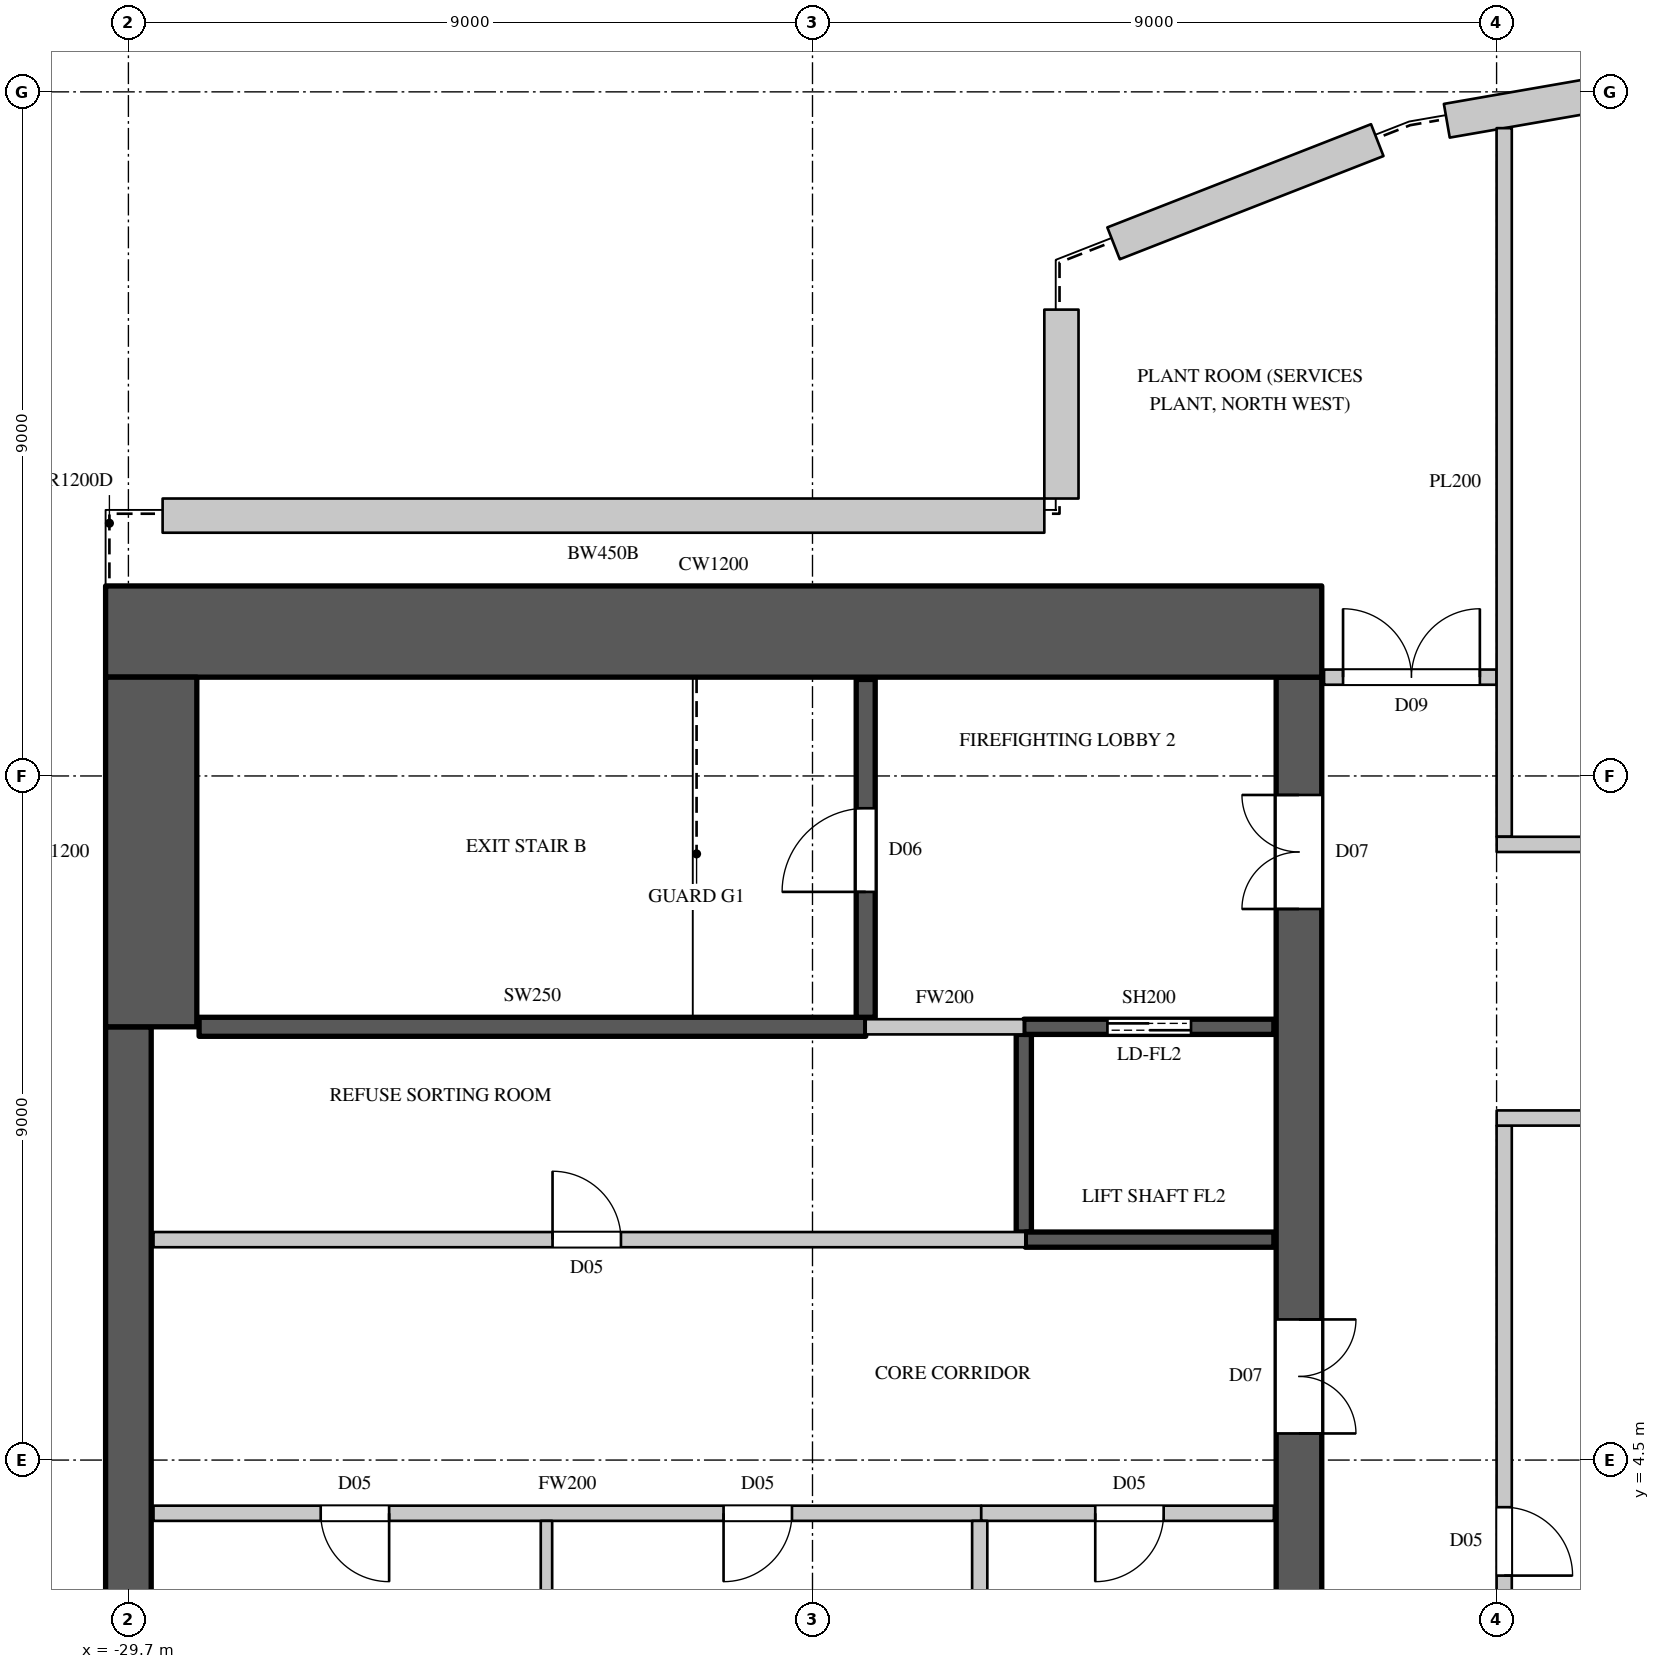
"""IFC4 building model, lengths in metres.
Left out: names, types, materials, properties, quantities, classifications, styles, units other than length and angle.
Written with IfcOpenShell. Run it as: python <this file> out.ifc"""

import sys

from ifc_helpers import new_model, si_unit, direction, frame, frame_2d, origin, place, context, subcontext, project, spatial, rectangle, extrude, element, fill, save


model = new_model("IFC4")
c1 = context("Model", 3, precision=1e-05, world=origin(), true_north=direction((0.0, 1.0)))
c2 = subcontext(c1, "Body", "Model", "MODEL_VIEW")
j1 = project(units=[si_unit("LENGTHUNIT", "METRE"), si_unit("PLANEANGLEUNIT", "RADIAN")], contexts=[c1])
p1 = place(None, origin())
s1 = spatial("IfcSite", under=j1, at=p1, CompositionType="ELEMENT")
p2 = place(p1, origin())
s2 = spatial("IfcBuilding", under=s1, at=p2, CompositionType="ELEMENT")
p3 = place(p2, frame((0.0, 0.0, 355.0)))
s3 = spatial("IfcBuildingStorey", under=s2, at=p3, CompositionType="ELEMENT", Elevation=355.0)
p4 = place(p3, frame((-6.782, 23.088, 0.0), z_axis=(0.0, 0.0, 1.0), x_axis=(-0.985240251318, -0.171177239091, 0.0)))
e1 = element("IfcWall", 1, at=p4, inside=s3, PredefinedType="SOLIDWALL", context=c2, shape_type="SweptSolid", body=[
    extrude(rectangle(XDim=5.656, YDim=0.45, at=frame_2d((2.828, 0.0))), origin(), (0.0, 0.0, 1.0), 4.0),
])
p5 = place(p3, frame((-13.27, 21.865, 0.0), z_axis=(0.0, 0.0, 1.0), x_axis=(-0.931207968362, -0.364488298384, 0.0)))
e2 = element("IfcWall", 2, at=p5, inside=s3, PredefinedType="SOLIDWALL", context=c2, shape_type="SweptSolid", body=[
    extrude(rectangle(XDim=3.726, YDim=0.45, at=frame_2d((1.863, 0.0))), origin(), (0.0, 0.0, 1.0), 4.0),
])
p6 = place(p3, frame((-17.425, 19.635, 0.0), z_axis=(0.0, 0.0, 1.0), x_axis=(0.0, -1.0, 0.0)))
e3 = element("IfcWall", 3, at=p6, inside=s3, PredefinedType="SOLIDWALL", context=c2, shape_type="SweptSolid", body=[
    extrude(rectangle(XDim=2.485, YDim=0.45, at=frame_2d((1.243, 0.0))), origin(), (0.0, 0.0, 1.0), 4.0),
])
p7 = place(p3, frame((-17.65, 16.925, 0.0), z_axis=(0.0, 0.0, 1.0), x_axis=(-1.0, 0.0, 0.0)))
e4 = element("IfcWall", 4, at=p7, inside=s3, PredefinedType="SOLIDWALL", context=c2, shape_type="SweptSolid", body=[
    extrude(rectangle(XDim=11.6, YDim=0.45, at=frame_2d((5.8, 0.0))), origin(), (0.0, 0.0, 1.0), 4.0),
])
p8 = place(p3, frame((-30.0, 15.4, 0.0), z_axis=(0.0, 0.0, 1.0), x_axis=(1.0, 0.0, 0.0)))
e5 = element("IfcWall", 5, at=p8, inside=s3, PredefinedType="SHEAR", context=c2, shape_type="SweptSolid", body=[
    extrude(rectangle(XDim=16.0, YDim=1.2, at=frame_2d((8.0, 0.0))), origin(), (0.0, 0.0, 1.0), 4.0),
])
p9 = place(p3, frame((-14.3, -14.8, 0.0), z_axis=(0.0, 0.0, 1.0), x_axis=(0.0, 1.0, 0.0)))
e6 = element("IfcWall", 6, at=p9, inside=s3, PredefinedType="SHEAR", context=c2, shape_type="SweptSolid", body=[
    extrude(rectangle(XDim=29.6, YDim=0.6, at=frame_2d((14.8, 0.0))), origin(), (0.0, 0.0, 1.0), 4.0),
])
p10 = place(p9, frame((1.55, 0.0, 0.0)))
e7 = element("IfcOpeningElement", 7, at=p10, cuts=e6, PredefinedType="OPENING", context=c2, shape_type="SweptSolid", body=[
    extrude(rectangle(XDim=1.5, YDim=2.4, at=frame_2d((0.75, 1.2))), frame((0.0, 0.31, 0.0), z_axis=(0.0, -1.0, 0.0), x_axis=(1.0, 0.0, 0.0)), (0.0, 0.0, 1.0), 0.62),
])
p11 = place(p9, frame((26.55, 0.0, 0.0)))
e8 = element("IfcOpeningElement", 8, at=p11, cuts=e6, PredefinedType="OPENING", context=c2, shape_type="SweptSolid", body=[
    extrude(rectangle(XDim=1.5, YDim=2.4, at=frame_2d((0.75, 1.2))), frame((0.0, 0.31, 0.0), z_axis=(0.0, -1.0, 0.0), x_axis=(1.0, 0.0, 0.0)), (0.0, 0.0, 1.0), 0.62),
])
p12 = place(p9, frame((8.45, 0.0, 0.0)))
e9 = element("IfcOpeningElement", 9, at=p12, cuts=e6, PredefinedType="OPENING", context=c2, shape_type="SweptSolid", body=[
    extrude(rectangle(XDim=1.5, YDim=2.4, at=frame_2d((0.75, 1.2))), frame((0.0, 0.31, 0.0), z_axis=(0.0, -1.0, 0.0), x_axis=(1.0, 0.0, 0.0)), (0.0, 0.0, 1.0), 0.62),
])
p13 = place(p9, frame((19.65, 0.0, 0.0)))
e10 = element("IfcOpeningElement", 10, at=p13, cuts=e6, PredefinedType="OPENING", context=c2, shape_type="SweptSolid", body=[
    extrude(rectangle(XDim=1.5, YDim=2.4, at=frame_2d((0.75, 1.2))), frame((0.0, 0.31, 0.0), z_axis=(0.0, -1.0, 0.0), x_axis=(1.0, 0.0, 0.0)), (0.0, 0.0, 1.0), 0.62),
])
p14 = place(p9, frame((14.5, 0.0, 0.0)))
e11 = element("IfcOpeningElement", 11, at=p14, cuts=e6, PredefinedType="OPENING", context=c2, shape_type="SweptSolid", body=[
    extrude(rectangle(XDim=0.6, YDim=2.0, at=frame_2d((0.3, 1.0))), frame((0.0, 0.31, 0.0), z_axis=(0.0, -1.0, 0.0), x_axis=(1.0, 0.0, 0.0)), (0.0, 0.0, 1.0), 0.62),
])
p15 = place(p3, frame((-29.7, -10.2, 0.0), z_axis=(0.0, 0.0, 1.0), x_axis=(0.0, 1.0, 0.0)))
e12 = element("IfcWall", 12, at=p15, inside=s3, PredefinedType="SHEAR", context=c2, shape_type="SweptSolid", body=[
    extrude(rectangle(XDim=20.4, YDim=0.6, at=frame_2d((10.2, 0.0))), origin(), (0.0, 0.0, 1.0), 4.0),
])
p16 = place(p3, frame((-29.4, 10.2, 0.0), z_axis=(0.0, 0.0, 1.0), x_axis=(0.0, 1.0, 0.0)))
e13 = element("IfcWall", 13, at=p16, inside=s3, PredefinedType="SHEAR", context=c2, shape_type="SweptSolid", body=[
    extrude(rectangle(XDim=4.6, YDim=1.2, at=frame_2d((2.3, 0.0))), origin(), (0.0, 0.0, 1.0), 4.0),
])
p17 = place(p3, frame((-29.37, 3.8, 0.0), z_axis=(0.0, 0.0, 1.0), x_axis=(1.0, 0.0, 0.0)))
e14 = element("IfcWall", 14, at=p17, inside=s3, PredefinedType="PARTITIONING", context=c2, shape_type="SweptSolid", body=[
    extrude(rectangle(XDim=10.89, YDim=0.2, at=frame_2d((5.445, 0.0))), origin(), (0.0, 0.0, 1.0), 3.548),
])
p18 = place(p17, frame((2.2, 0.0, 0.0)))
e15 = element("IfcOpeningElement", 15, at=p18, cuts=e14, PredefinedType="OPENING", context=c2, shape_type="SweptSolid", body=[
    extrude(rectangle(XDim=0.9, YDim=2.2, at=frame_2d((0.45, 1.1))), frame((0.0, 0.11, 0.0), z_axis=(0.0, -1.0, 0.0), x_axis=(1.0, 0.0, 0.0)), (0.0, 0.0, 1.0), 0.22),
])
p19 = place(p17, frame((7.5, 0.0, 0.0)))
e16 = element("IfcOpeningElement", 16, at=p19, cuts=e14, PredefinedType="OPENING", context=c2, shape_type="SweptSolid", body=[
    extrude(rectangle(XDim=0.9, YDim=2.2, at=frame_2d((0.45, 1.1))), frame((0.0, 0.11, 0.0), z_axis=(0.0, -1.0, 0.0), x_axis=(1.0, 0.0, 0.0)), (0.0, 0.0, 1.0), 0.22),
])
p20 = place(p3, frame((-29.37, 7.4, 0.0), z_axis=(0.0, 0.0, 1.0), x_axis=(1.0, 0.0, 0.0)))
e17 = element("IfcWall", 17, at=p20, inside=s3, PredefinedType="PARTITIONING", context=c2, shape_type="SweptSolid", body=[
    extrude(rectangle(XDim=11.47, YDim=0.2, at=frame_2d((5.735, 0.0))), origin(), (0.0, 0.0, 1.0), 3.548),
])
p21 = place(p20, frame((5.25, 0.0, 0.0)))
e18 = element("IfcOpeningElement", 18, at=p21, cuts=e17, PredefinedType="OPENING", context=c2, shape_type="SweptSolid", body=[
    extrude(rectangle(XDim=0.9, YDim=2.2, at=frame_2d((0.45, 1.1))), frame((0.0, 0.11, 0.0), z_axis=(0.0, -1.0, 0.0), x_axis=(1.0, 0.0, 0.0)), (0.0, 0.0, 1.0), 0.22),
])
p22 = place(p3, frame((-20.0, 10.2, 0.0), z_axis=(0.0, 0.0, 1.0), x_axis=(1.0, 0.0, 0.0)))
e19 = element("IfcWall", 19, at=p22, inside=s3, PredefinedType="PARTITIONING", context=c2, shape_type="SweptSolid", body=[
    extrude(rectangle(XDim=2.08, YDim=0.2, at=frame_2d((1.04, 0.0))), origin(), (0.0, 0.0, 1.0), 3.548),
])
p23 = place(p3, frame((-11.6, -2.02, 0.0), z_axis=(0.0, 0.0, 1.0), x_axis=(0.0, 1.0, 0.0)))
e20 = element("IfcWall", 20, at=p23, inside=s3, PredefinedType="PARTITIONING", context=c2, shape_type="SweptSolid", body=[
    extrude(rectangle(XDim=10.919, YDim=0.2, at=frame_2d((5.459, 0.0))), origin(), (0.0, 0.0, 1.0), 3.548),
])
p24 = place(p23, frame((5.0, 0.0, 0.0)))
e21 = element("IfcOpeningElement", 21, at=p24, cuts=e20, PredefinedType="OPENING", context=c2, shape_type="SweptSolid", body=[
    extrude(rectangle(XDim=0.9, YDim=2.2, at=frame_2d((0.45, 1.1))), frame((0.0, 0.11, 0.0), z_axis=(0.0, -1.0, 0.0), x_axis=(1.0, 0.0, 0.0)), (0.0, 0.0, 1.0), 0.22),
])
p25 = place(p3, frame((-11.699, 9.0, 0.0), z_axis=(0.0, 0.0, 1.0), x_axis=(1.0, 0.0, 0.0)))
e22 = element("IfcWall", 22, at=p25, inside=s3, PredefinedType="PARTITIONING", context=c2, shape_type="SweptSolid", body=[
    extrude(rectangle(XDim=19.679, YDim=0.2, at=frame_2d((9.839, 0.0))), origin(), (0.0, 0.0, 1.0), 3.548),
])
p26 = place(p3, frame((-24.2, 1.1, 0.0), z_axis=(0.0, 0.0, 1.0), x_axis=(0.0, 1.0, 0.0)))
e23 = element("IfcWall", 23, at=p26, inside=s3, PredefinedType="PARTITIONING", context=c2, shape_type="SweptSolid", body=[
    extrude(rectangle(XDim=2.6, YDim=0.15, at=frame_2d((1.3, 0.0))), origin(), (0.0, 0.0, 1.0), 3.548),
])
p27 = place(p3, frame((-18.48, 3.8, 0.0), z_axis=(0.0, 0.0, 1.0), x_axis=(1.0, 0.0, 0.0)))
e24 = element("IfcWall", 24, at=p27, inside=s3, PredefinedType="PARTITIONING", context=c2, shape_type="SweptSolid", body=[
    extrude(rectangle(XDim=3.85, YDim=0.2, at=frame_2d((1.925, 0.0))), origin(), (0.0, 0.0, 1.0), 3.548),
])
p28 = place(p27, frame((1.5, 0.0, 0.0)))
e25 = element("IfcOpeningElement", 25, at=p28, cuts=e24, PredefinedType="OPENING", context=c2, shape_type="SweptSolid", body=[
    extrude(rectangle(XDim=0.9, YDim=2.2, at=frame_2d((0.45, 1.1))), frame((0.0, 0.11, 0.0), z_axis=(0.0, -1.0, 0.0), x_axis=(1.0, 0.0, 0.0)), (0.0, 0.0, 1.0), 0.22),
])
p29 = place(p3, frame((-18.5, 1.1, 0.0), z_axis=(0.0, 0.0, 1.0), x_axis=(0.0, 1.0, 0.0)))
e26 = element("IfcWall", 26, at=p29, inside=s3, PredefinedType="PARTITIONING", context=c2, shape_type="SweptSolid", body=[
    extrude(rectangle(XDim=2.6, YDim=0.2, at=frame_2d((1.3, 0.0))), origin(), (0.0, 0.0, 1.0), 3.548),
])
p30 = place(p3, frame((-13.97, 14.8, 0.0), z_axis=(0.0, 0.0, 1.0), x_axis=(1.0, 0.0, 0.0)))
e27 = element("IfcWall", 27, at=p30, inside=s3, PredefinedType="PARTITIONING", context=c2, shape_type="SweptSolid", body=[
    extrude(rectangle(XDim=2.27, YDim=0.2, at=frame_2d((1.135, 0.0))), origin(), (0.0, 0.0, 1.0), 3.548),
])
p31 = place(p30, frame((0.25, 0.0, 0.0)))
e28 = element("IfcOpeningElement", 28, at=p31, cuts=e27, PredefinedType="OPENING", context=c2, shape_type="SweptSolid", body=[
    extrude(rectangle(XDim=1.8, YDim=2.4, at=frame_2d((0.9, 1.2))), frame((0.0, 0.11, 0.0), z_axis=(0.0, -1.0, 0.0), x_axis=(1.0, 0.0, 0.0)), (0.0, 0.0, 1.0), 0.22),
])
p32 = place(p3, frame((-11.6, 12.701, 0.0), z_axis=(0.0, 0.0, 1.0), x_axis=(0.0, 1.0, 0.0)))
e29 = element("IfcWall", 29, at=p32, inside=s3, PredefinedType="PARTITIONING", context=c2, shape_type="SweptSolid", body=[
    extrude(rectangle(XDim=9.322, YDim=0.2, at=frame_2d((4.661, 0.0))), origin(), (0.0, 0.0, 1.0), 3.548),
])
p33 = place(p3, frame((-11.699, 12.6, 0.0), z_axis=(0.0, 0.0, 1.0), x_axis=(1.0, 0.0, 0.0)))
e30 = element("IfcWall", 30, at=p33, inside=s3, PredefinedType="PARTITIONING", context=c2, shape_type="SweptSolid", body=[
    extrude(rectangle(XDim=5.454, YDim=0.2, at=frame_2d((2.727, 0.0))), origin(), (0.0, 0.0, 1.0), 3.548),
])
p34 = place(p33, frame((1.8, 0.0, 0.0)))
e31 = element("IfcOpeningElement", 31, at=p34, cuts=e30, PredefinedType="OPENING", context=c2, shape_type="SweptSolid", body=[
    extrude(rectangle(XDim=1.8, YDim=2.4, at=frame_2d((0.9, 1.2))), frame((0.0, 0.11, 0.0), z_axis=(0.0, -1.0, 0.0), x_axis=(1.0, 0.0, 0.0)), (0.0, 0.0, 1.0), 0.22),
])
p35 = place(p3, frame((-17.92, 7.5, 0.0), z_axis=(0.0, 0.0, 1.0), x_axis=(0.0, 1.0, 0.0)))
e32 = element("IfcWall", 32, at=p35, inside=s3, PredefinedType="SHEAR", context=c2, shape_type="SweptSolid", body=[
    extrude(rectangle(XDim=2.6, YDim=0.2, at=frame_2d((1.3, 0.0))), origin(), (0.0, 0.0, 1.0), 3.548),
])
p36 = place(p3, frame((-17.9, 7.4, 0.0), z_axis=(0.0, 0.0, 1.0), x_axis=(1.0, 0.0, 0.0)))
e33 = element("IfcWall", 33, at=p36, inside=s3, PredefinedType="SHEAR", context=c2, shape_type="SweptSolid", body=[
    extrude(rectangle(XDim=3.27, YDim=0.2, at=frame_2d((1.635, 0.0))), origin(), (0.0, 0.0, 1.0), 3.548),
])
p37 = place(p3, frame((-17.92, 10.2, 0.0), z_axis=(0.0, 0.0, 1.0), x_axis=(1.0, 0.0, 0.0)))
e34 = element("IfcWall", 34, at=p37, inside=s3, PredefinedType="SHEAR", context=c2, shape_type="SweptSolid", body=[
    extrude(rectangle(XDim=3.29, YDim=0.2, at=frame_2d((1.645, 0.0))), origin(), (0.0, 0.0, 1.0), 3.548),
])
p38 = place(p37, frame((1.1, 0.0, 0.0)))
e35 = element("IfcOpeningElement", 35, at=p38, cuts=e34, PredefinedType="OPENING", context=c2, shape_type="SweptSolid", body=[
    extrude(rectangle(XDim=1.1, YDim=2.2, at=frame_2d((0.55, 1.1))), frame((0.0, 0.11, 0.0), z_axis=(0.0, -1.0, 0.0), x_axis=(1.0, 0.0, 0.0)), (0.0, 0.0, 1.0), 0.22),
])
p39 = place(p3, frame((-28.77, 10.2, 0.0), z_axis=(0.0, 0.0, 1.0), x_axis=(1.0, 0.0, 0.0)))
e36 = element("IfcWall", 36, at=p39, inside=s3, PredefinedType="SHEAR", context=c2, shape_type="SweptSolid", body=[
    extrude(rectangle(XDim=8.77, YDim=0.25, at=frame_2d((4.385, 0.0))), origin(), (0.0, 0.0, 1.0), 3.548),
])
p40 = place(p3, frame((-20.0, 10.325, 0.0), z_axis=(0.0, 0.0, 1.0), x_axis=(0.0, 1.0, 0.0)))
e37 = element("IfcWall", 37, at=p40, inside=s3, PredefinedType="SHEAR", context=c2, shape_type="SweptSolid", body=[
    extrude(rectangle(XDim=4.445, YDim=0.25, at=frame_2d((2.223, 0.0))), origin(), (0.0, 0.0, 1.0), 3.548),
])
p41 = place(p40, frame((1.65, 0.0, 0.0)))
e38 = element("IfcOpeningElement", 38, at=p41, cuts=e37, PredefinedType="OPENING", context=c2, shape_type="SweptSolid", body=[
    extrude(rectangle(XDim=1.1, YDim=2.2, at=frame_2d((0.55, 1.1))), frame((0.0, 0.135, 0.0), z_axis=(0.0, -1.0, 0.0), x_axis=(1.0, 0.0, 0.0)), (0.0, 0.0, 1.0), 0.27),
])
p42 = place(p41, origin())
e39 = element("IfcDoor", 39, at=p42, inside=s3, OperationType="SINGLE_SWING_LEFT", PredefinedType="DOOR", context=c2, shape_type="SweptSolid", body=[
    extrude(rectangle(XDim=1.1, YDim=2.2, at=frame_2d((0.55, 1.1))), frame((0.0, 0.025, 0.0), z_axis=(0.0, -1.0, 0.0), x_axis=(1.0, 0.0, 0.0)), (0.0, 0.0, 1.0), 0.05),
])
fill(e38, e39)
p43 = place(p18, origin())
e40 = element("IfcDoor", 40, at=p43, inside=s3, OperationType="SINGLE_SWING_LEFT", PredefinedType="DOOR", context=c2, shape_type="SweptSolid", body=[
    extrude(rectangle(XDim=0.9, YDim=2.2, at=frame_2d((0.45, 1.1))), frame((0.0, 0.025, 0.0), z_axis=(0.0, -1.0, 0.0), x_axis=(1.0, 0.0, 0.0)), (0.0, 0.0, 1.0), 0.05),
])
fill(e15, e40)
p44 = place(p19, origin())
e41 = element("IfcDoor", 41, at=p44, inside=s3, OperationType="SINGLE_SWING_RIGHT", PredefinedType="DOOR", context=c2, shape_type="SweptSolid", body=[
    extrude(rectangle(XDim=0.9, YDim=2.2, at=frame_2d((0.45, 1.1))), frame((0.0, 0.025, 0.0), z_axis=(0.0, -1.0, 0.0), x_axis=(1.0, 0.0, 0.0)), (0.0, 0.0, 1.0), 0.05),
])
fill(e16, e41)
p45 = place(p28, origin())
e42 = element("IfcDoor", 42, at=p45, inside=s3, OperationType="SINGLE_SWING_RIGHT", PredefinedType="DOOR", context=c2, shape_type="SweptSolid", body=[
    extrude(rectangle(XDim=0.9, YDim=2.2, at=frame_2d((0.45, 1.1))), frame((0.0, 0.025, 0.0), z_axis=(0.0, -1.0, 0.0), x_axis=(1.0, 0.0, 0.0)), (0.0, 0.0, 1.0), 0.05),
])
fill(e25, e42)
p46 = place(p21, origin())
e43 = element("IfcDoor", 43, at=p46, inside=s3, OperationType="SINGLE_SWING_LEFT", PredefinedType="DOOR", context=c2, shape_type="SweptSolid", body=[
    extrude(rectangle(XDim=0.9, YDim=2.2, at=frame_2d((0.45, 1.1))), frame((0.0, 0.025, 0.0), z_axis=(0.0, -1.0, 0.0), x_axis=(1.0, 0.0, 0.0)), (0.0, 0.0, 1.0), 0.05),
])
fill(e18, e43)
p47 = place(p38, origin())
e44 = element("IfcDoor", 44, at=p47, inside=s3, OperationType="DOUBLE_DOOR_SLIDING", PredefinedType="DOOR", context=c2, shape_type="SweptSolid", body=[
    extrude(rectangle(XDim=1.1, YDim=2.2, at=frame_2d((0.55, 1.1))), frame((0.0, 0.025, 0.0), z_axis=(0.0, -1.0, 0.0), x_axis=(1.0, 0.0, 0.0)), (0.0, 0.0, 1.0), 0.05),
])
fill(e35, e44)
p48 = place(p24, origin())
e45 = element("IfcDoor", 45, at=p48, inside=s3, OperationType="SINGLE_SWING_RIGHT", PredefinedType="DOOR", context=c2, shape_type="SweptSolid", body=[
    extrude(rectangle(XDim=0.9, YDim=2.2, at=frame_2d((0.45, 1.1))), frame((0.0, 0.025, 0.0), z_axis=(0.0, -1.0, 0.0), x_axis=(1.0, 0.0, 0.0)), (0.0, 0.0, 1.0), 0.05),
])
fill(e21, e45)
p49 = place(p31, origin())
e46 = element("IfcDoor", 46, at=p49, inside=s3, OperationType="DOUBLE_DOOR_SINGLE_SWING", PredefinedType="DOOR", context=c2, shape_type="SweptSolid", body=[
    extrude(rectangle(XDim=1.8, YDim=2.4, at=frame_2d((0.9, 1.2))), frame((0.0, 0.025, 0.0), z_axis=(0.0, -1.0, 0.0), x_axis=(1.0, 0.0, 0.0)), (0.0, 0.0, 1.0), 0.05),
])
fill(e28, e46)
p50 = place(p11, origin())
e47 = element("IfcDoor", 47, at=p50, inside=s3, OperationType="DOUBLE_DOOR_SINGLE_SWING", PredefinedType="DOOR", context=c2, shape_type="SweptSolid", body=[
    extrude(rectangle(XDim=1.5, YDim=2.4, at=frame_2d((0.75, 1.2))), frame((0.0, 0.295, 0.0), z_axis=(0.0, -1.0, 0.0), x_axis=(1.0, 0.0, 0.0)), (0.0, 0.0, 1.0), 0.05),
])
fill(e8, e47)
p51 = place(p13, origin())
e48 = element("IfcDoor", 48, at=p51, inside=s3, OperationType="DOUBLE_DOOR_SINGLE_SWING", PredefinedType="DOOR", context=c2, shape_type="SweptSolid", body=[
    extrude(rectangle(XDim=1.5, YDim=2.4, at=frame_2d((0.75, 1.2))), frame((0.0, -0.245, 0.0), z_axis=(0.0, -1.0, 0.0), x_axis=(1.0, 0.0, 0.0)), (0.0, 0.0, 1.0), 0.05),
])
fill(e10, e48)
save(model, sys.argv[1])
